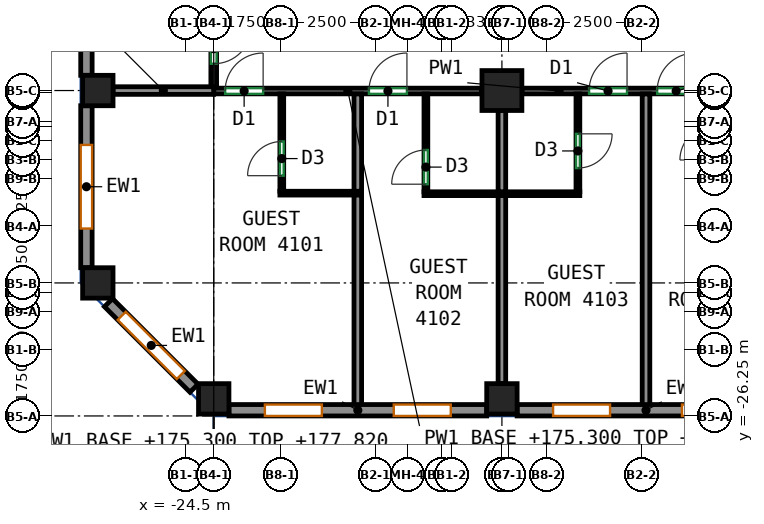
"""IFC4 building model, lengths in metres.
Left out: names, types, materials, properties, quantities, classifications, styles, units other than length and angle.
Written with IfcOpenShell. Run it as: python <this file> out.ifc"""

import sys

from ifc_helpers import new_model, si_unit, direction, frame, frame_2d, origin, origin_2d, place, context, subcontext, project, spatial, rectangle, extrude, source, transform, mapped, element, fill, save


model = new_model("IFC4")
c1 = context("Model", 3, precision=1e-05, world=origin(), true_north=direction((0.0, 1.0)))
c2 = subcontext(c1, "Body", "Model", "MODEL_VIEW")
j1 = project(units=[si_unit("LENGTHUNIT", "METRE"), si_unit("PLANEANGLEUNIT", "RADIAN")], contexts=[c1])
p1 = place(None, origin())
s1 = spatial("IfcSite", under=j1, at=p1, CompositionType="ELEMENT")
p2 = place(p1, origin())
s2 = spatial("IfcBuilding", under=s1, at=p2, CompositionType="ELEMENT")
p3 = place(p2, frame((0.0, 0.0, 175.3)))
s3 = spatial("IfcBuildingStorey", under=s2, at=p3, CompositionType="ELEMENT", Elevation=175.3)
m1 = source(origin(), c2, "Body", "SweptSolid", [
    extrude(rectangle(XDim=0.8, YDim=0.8, at=origin_2d()), origin(), (0.0, 0.0, 1.0), 3.12),
])
for number, where, z_axis, x_axis in (
    (1, (-26.8, -22.75, 0.0), (0.0, 0.0, 1.0), (1.0, 0.0, 0.0)),
    (2, (-26.8, -17.688, 0.0), (0.0, 0.0, 1.0), (1.0, 0.0, 0.0)),
    (3, (-23.75, -25.8, 0.0), (0.0, 0.0, 1.0), (1.0, 0.0, 0.0)),
    (4, (-16.167, -25.8, 0.0), (0.0, 0.0, 1.0), (1.0, 0.0, 0.0)),
):
    element("IfcColumn", number, at=place(p3, frame(where, z_axis=z_axis, x_axis=x_axis)), inside=s3, PredefinedType="COLUMN", context=c2, shape_type="MappedRepresentation", body=[
        mapped(m1, transform((0.0, 0.0, 0.0))),
    ])
m2 = source(origin(), c2, "Body", "SweptSolid", [
    extrude(rectangle(XDim=1.05, YDim=1.05, at=origin_2d()), origin(), (0.0, 0.0, 1.0), 3.12),
])
p4 = place(p3, frame((-16.167, -17.688, 0.0), z_axis=(0.0, 0.0, 1.0), x_axis=(1.0, 0.0, 0.0)))
e5 = element("IfcColumn", 5, at=p4, inside=s3, PredefinedType="COLUMN", context=c2, shape_type="MappedRepresentation", body=[
    mapped(m2, transform((0.0, 0.0, 0.0))),
])
m3 = source(origin(), c2, "Body", "SweptSolid", [
    extrude(rectangle(XDim=6.783, YDim=0.3, at=frame_2d((3.392, 0.0))), origin(), (0.0, 0.0, 1.0), 3.12),
])
p5 = place(p3, frame((-23.35, -26.1, 0.0), z_axis=(0.0, 0.0, 1.0), x_axis=(1.0, 0.0, 0.0)))
e6 = element("IfcWall", 6, at=p5, inside=s3, PredefinedType="SOLIDWALL", context=c2, shape_type="MappedRepresentation", body=[
    mapped(m3, transform((0.0, 0.0, 0.0))),
])
p6 = place(p5, frame((0.946, 0.0, 0.85)))
e7 = element("IfcOpeningElement", 7, at=p6, cuts=e6, PredefinedType="OPENING", context=c2, shape_type="SweptSolid", body=[
    extrude(rectangle(XDim=1.5, YDim=1.95, at=frame_2d((0.75, 0.975))), frame((0.0, 0.16, 0.0), z_axis=(0.0, -1.0, 0.0), x_axis=(1.0, 0.0, 0.0)), (0.0, 0.0, 1.0), 0.32),
])
p7 = place(p5, frame((4.337, 0.0, 0.85)))
e8 = element("IfcOpeningElement", 8, at=p7, cuts=e6, PredefinedType="OPENING", context=c2, shape_type="SweptSolid", body=[
    extrude(rectangle(XDim=1.5, YDim=1.95, at=frame_2d((0.75, 0.975))), frame((0.0, 0.16, 0.0), z_axis=(0.0, -1.0, 0.0), x_axis=(1.0, 0.0, 0.0)), (0.0, 0.0, 1.0), 0.32),
])
m4 = source(origin(), c2, "Body", "SweptSolid", [
    extrude(rectangle(XDim=6.783, YDim=0.3, at=frame_2d((3.392, 0.0))), origin(), (0.0, 0.0, 1.0), 3.12),
])
p8 = place(p3, frame((-15.767, -26.1, 0.0), z_axis=(0.0, 0.0, 1.0), x_axis=(1.0, 0.0, 0.0)))
e9 = element("IfcWall", 9, at=p8, inside=s3, PredefinedType="SOLIDWALL", context=c2, shape_type="MappedRepresentation", body=[
    mapped(m4, transform((0.0, 0.0, 0.0))),
])
p9 = place(p8, frame((0.946, 0.0, 0.85)))
e10 = element("IfcOpeningElement", 10, at=p9, cuts=e9, PredefinedType="OPENING", context=c2, shape_type="SweptSolid", body=[
    extrude(rectangle(XDim=1.5, YDim=1.95, at=frame_2d((0.75, 0.975))), frame((0.0, 0.16, 0.0), z_axis=(0.0, -1.0, 0.0), x_axis=(1.0, 0.0, 0.0)), (0.0, 0.0, 1.0), 0.32),
])
p10 = place(p8, frame((4.338, 0.0, 0.85)))
e11 = element("IfcOpeningElement", 11, at=p10, cuts=e9, PredefinedType="OPENING", context=c2, shape_type="SweptSolid", body=[
    extrude(rectangle(XDim=1.5, YDim=1.95, at=frame_2d((0.75, 0.975))), frame((0.0, 0.16, 0.0), z_axis=(0.0, -1.0, 0.0), x_axis=(1.0, 0.0, 0.0)), (0.0, 0.0, 1.0), 0.32),
])
m5 = source(origin(), c2, "Body", "SweptSolid", [
    extrude(rectangle(XDim=7.763, YDim=0.3, at=frame_2d((3.881, 0.0))), origin(), (0.0, 0.0, 1.0), 3.12),
])
p11 = place(p3, frame((-27.1, -9.525, 0.0), z_axis=(0.0, 0.0, 1.0), x_axis=(0.0, -1.0, 0.0)))
e12 = element("IfcWall", 12, at=p11, inside=s3, PredefinedType="SOLIDWALL", context=c2, shape_type="MappedRepresentation", body=[
    mapped(m5, transform((0.0, 0.0, 0.0))),
])
p12 = place(p11, frame((0.841, 0.0, 0.85)))
e13 = element("IfcOpeningElement", 13, at=p12, cuts=e12, PredefinedType="OPENING", context=c2, shape_type="SweptSolid", body=[
    extrude(rectangle(XDim=2.2, YDim=1.95, at=frame_2d((1.1, 0.975))), frame((0.0, 0.16, 0.0), z_axis=(0.0, -1.0, 0.0), x_axis=(1.0, 0.0, 0.0)), (0.0, 0.0, 1.0), 0.32),
])
p13 = place(p11, frame((4.722, 0.0, 0.85)))
e14 = element("IfcOpeningElement", 14, at=p13, cuts=e12, PredefinedType="OPENING", context=c2, shape_type="SweptSolid", body=[
    extrude(rectangle(XDim=2.2, YDim=1.95, at=frame_2d((1.1, 0.975))), frame((0.0, 0.16, 0.0), z_axis=(0.0, -1.0, 0.0), x_axis=(1.0, 0.0, 0.0)), (0.0, 0.0, 1.0), 0.32),
])
m6 = source(origin(), c2, "Body", "SweptSolid", [
    extrude(rectangle(XDim=4.263, YDim=0.3, at=frame_2d((2.131, 0.0))), origin(), (0.0, 0.0, 1.0), 3.12),
])
p14 = place(p3, frame((-27.1, -18.087, 0.0), z_axis=(0.0, 0.0, 1.0), x_axis=(0.0, -1.0, 0.0)))
e15 = element("IfcWall", 15, at=p14, inside=s3, PredefinedType="SOLIDWALL", context=c2, shape_type="MappedRepresentation", body=[
    mapped(m6, transform((0.0, 0.0, 0.0))),
])
p15 = place(p14, frame((1.031, 0.0, 0.85)))
e16 = element("IfcOpeningElement", 16, at=p15, cuts=e15, PredefinedType="OPENING", context=c2, shape_type="SweptSolid", body=[
    extrude(rectangle(XDim=2.2, YDim=1.95, at=frame_2d((1.1, 0.975))), frame((0.0, 0.16, 0.0), z_axis=(0.0, -1.0, 0.0), x_axis=(1.0, 0.0, 0.0)), (0.0, 0.0, 1.0), 0.32),
])
m7 = source(origin(), c2, "Body", "SweptSolid", [
    extrude(rectangle(XDim=3.182, YDim=0.3, at=frame_2d((1.591, 0.0))), origin(), (0.0, 0.0, 1.0), 3.12),
])
p16 = place(p3, frame((-26.519, -23.269, 0.0), z_axis=(0.0, 0.0, 1.0), x_axis=(0.707068419229, -0.707145141063, 0.0)))
e17 = element("IfcWall", 17, at=p16, inside=s3, PredefinedType="SOLIDWALL", context=c2, shape_type="MappedRepresentation", body=[
    mapped(m7, transform((0.0, 0.0, 0.0))),
])
p17 = place(p16, frame((0.491, 0.0, 0.85)))
e18 = element("IfcOpeningElement", 18, at=p17, cuts=e17, PredefinedType="OPENING", context=c2, shape_type="SweptSolid", body=[
    extrude(rectangle(XDim=2.2, YDim=1.95, at=frame_2d((1.1, 0.975))), frame((0.0, 0.16, 0.0), z_axis=(0.0, -1.0, 0.0), x_axis=(1.0, 0.0, 0.0)), (0.0, 0.0, 1.0), 0.32),
])
p18 = place(p3, frame((-23.75, -17.7, 0.0), z_axis=(0.0, 0.0, 1.0), x_axis=(1.0, 0.0, 0.0)))
e19 = element("IfcWall", 19, at=p18, inside=s3, PredefinedType="PARTITIONING", context=c2, shape_type="SweptSolid", body=[
    extrude(rectangle(XDim=7.058, YDim=0.15, at=frame_2d((3.529, 0.0))), origin(), (0.0, 0.0, 1.0), 2.52),
])
p19 = place(p18, frame((0.3, 0.0, 0.0)))
e20 = element("IfcOpeningElement", 20, at=p19, cuts=e19, PredefinedType="OPENING", context=c2, shape_type="SweptSolid", body=[
    extrude(rectangle(XDim=1.0, YDim=2.1, at=frame_2d((0.5, 1.05))), frame((0.0, 0.085, 0.0), z_axis=(0.0, -1.0, 0.0), x_axis=(1.0, 0.0, 0.0)), (0.0, 0.0, 1.0), 0.17),
])
p20 = place(p18, frame((4.084, 0.0, 0.0)))
e21 = element("IfcOpeningElement", 21, at=p20, cuts=e19, PredefinedType="OPENING", context=c2, shape_type="SweptSolid", body=[
    extrude(rectangle(XDim=1.0, YDim=2.1, at=frame_2d((0.5, 1.05))), frame((0.0, 0.085, 0.0), z_axis=(0.0, -1.0, 0.0), x_axis=(1.0, 0.0, 0.0)), (0.0, 0.0, 1.0), 0.17),
])
p21 = place(p3, frame((-15.642, -17.7, 0.0), z_axis=(0.0, 0.0, 1.0), x_axis=(1.0, 0.0, 0.0)))
e22 = element("IfcWall", 22, at=p21, inside=s3, PredefinedType="PARTITIONING", context=c2, shape_type="SweptSolid", body=[
    extrude(rectangle(XDim=6.534, YDim=0.15, at=frame_2d((3.267, 0.0))), origin(), (0.0, 0.0, 1.0), 3.12),
])
p22 = place(p21, frame((1.768, 0.0, 0.0)))
e23 = element("IfcOpeningElement", 23, at=p22, cuts=e22, PredefinedType="OPENING", context=c2, shape_type="SweptSolid", body=[
    extrude(rectangle(XDim=1.0, YDim=2.1, at=frame_2d((0.5, 1.05))), frame((0.0, 0.085, 0.0), z_axis=(0.0, -1.0, 0.0), x_axis=(1.0, 0.0, 0.0)), (0.0, 0.0, 1.0), 0.17),
])
p23 = place(p21, frame((3.56, 0.0, 0.0)))
e24 = element("IfcOpeningElement", 24, at=p23, cuts=e22, PredefinedType="OPENING", context=c2, shape_type="SweptSolid", body=[
    extrude(rectangle(XDim=1.0, YDim=2.1, at=frame_2d((0.5, 1.05))), frame((0.0, 0.085, 0.0), z_axis=(0.0, -1.0, 0.0), x_axis=(1.0, 0.0, 0.0)), (0.0, 0.0, 1.0), 0.17),
])
p24 = place(p3, frame((-23.75, -15.575, 0.0), z_axis=(0.0, 0.0, 1.0), x_axis=(0.0, -1.0, 0.0)))
e25 = element("IfcWall", 25, at=p24, inside=s3, PredefinedType="PARTITIONING", context=c2, shape_type="SweptSolid", body=[
    extrude(rectangle(XDim=2.023, YDim=0.15, at=frame_2d((1.011, 0.0))), origin(), (0.0, 0.0, 1.0), 2.52),
])
p25 = place(p24, frame((0.408, 0.0, 0.0)))
e26 = element("IfcOpeningElement", 26, at=p25, cuts=e25, PredefinedType="OPENING", context=c2, shape_type="SweptSolid", body=[
    extrude(rectangle(XDim=1.0, YDim=2.1, at=frame_2d((0.5, 1.05))), frame((0.0, 0.085, 0.0), z_axis=(0.0, -1.0, 0.0), x_axis=(1.0, 0.0, 0.0)), (0.0, 0.0, 1.0), 0.17),
])
p26 = place(p3, frame((-21.959, -20.338, 0.0), z_axis=(0.0, 0.0, 1.0), x_axis=(0.0, 1.0, 0.0)))
e27 = element("IfcWall", 27, at=p26, inside=s3, PredefinedType="PARTITIONING", context=c2, shape_type="SweptSolid", body=[
    extrude(rectangle(XDim=2.561, YDim=0.1, at=frame_2d((1.28, 0.0))), origin(), (0.0, 0.0, 1.0), 3.12),
])
p27 = place(p26, frame((0.41, 0.0, 0.0)))
e28 = element("IfcOpeningElement", 28, at=p27, cuts=e27, PredefinedType="OPENING", context=c2, shape_type="SweptSolid", body=[
    extrude(rectangle(XDim=0.9, YDim=2.1, at=frame_2d((0.45, 1.05))), frame((0.0, 0.06, 0.0), z_axis=(0.0, -1.0, 0.0), x_axis=(1.0, 0.0, 0.0)), (0.0, 0.0, 1.0), 0.12),
])
p28 = place(p3, frame((-22.009, -20.388, 0.0), z_axis=(0.0, 0.0, 1.0), x_axis=(1.0, 0.0, 0.0)))
e29 = element("IfcWall", 29, at=p28, inside=s3, PredefinedType="PARTITIONING", context=c2, shape_type="SweptSolid", body=[
    extrude(rectangle(XDim=2.15, YDim=0.1, at=frame_2d((1.075, 0.0))), origin(), (0.0, 0.0, 1.0), 3.12),
])
p29 = place(p3, frame((-19.959, -26.0, 0.0), z_axis=(0.0, 0.0, 1.0), x_axis=(0.0, 1.0, 0.0)))
e30 = element("IfcWall", 30, at=p29, inside=s3, PredefinedType="PARTITIONING", context=c2, shape_type="SweptSolid", body=[
    extrude(rectangle(XDim=5.562, YDim=0.2, at=frame_2d((2.781, 0.0))), origin(), (0.0, 0.0, 1.0), 3.12),
])
p30 = place(p3, frame((-26.4, -17.688, 0.0), z_axis=(0.0, 0.0, 1.0), x_axis=(1.0, 0.0, 0.0)))
e31 = element("IfcWall", 31, at=p30, inside=s3, PredefinedType="PARTITIONING", context=c2, shape_type="SweptSolid", body=[
    extrude(rectangle(XDim=2.648, YDim=0.2, at=frame_2d((1.324, 0.0))), origin(), (0.0, 0.0, 1.0), 2.52),
])
p31 = place(p3, frame((-19.959, -20.338, 0.0), z_axis=(0.0, 0.0, 1.0), x_axis=(0.0, 1.0, 0.0)))
e32 = element("IfcWall", 32, at=p31, inside=s3, PredefinedType="PARTITIONING", context=c2, shape_type="SweptSolid", body=[
    extrude(rectangle(XDim=2.561, YDim=0.2, at=frame_2d((1.28, 0.0))), origin(), (0.0, 0.0, 1.0), 3.12),
])
p32 = place(p3, frame((-18.167, -20.352, 0.0), z_axis=(0.0, 0.0, 1.0), x_axis=(0.0, 1.0, 0.0)))
e33 = element("IfcWall", 33, at=p32, inside=s3, PredefinedType="PARTITIONING", context=c2, shape_type="SweptSolid", body=[
    extrude(rectangle(XDim=2.575, YDim=0.1, at=frame_2d((1.288, 0.0))), origin(), (0.0, 0.0, 1.0), 3.12),
])
p33 = place(p32, frame((0.2, 0.0, 0.0)))
e34 = element("IfcOpeningElement", 34, at=p33, cuts=e33, PredefinedType="OPENING", context=c2, shape_type="SweptSolid", body=[
    extrude(rectangle(XDim=0.9, YDim=2.1, at=frame_2d((0.45, 1.05))), frame((0.0, 0.06, 0.0), z_axis=(0.0, -1.0, 0.0), x_axis=(1.0, 0.0, 0.0)), (0.0, 0.0, 1.0), 0.12),
])
p34 = place(p3, frame((-18.217, -20.402, 0.0), z_axis=(0.0, 0.0, 1.0), x_axis=(1.0, 0.0, 0.0)))
e35 = element("IfcWall", 35, at=p34, inside=s3, PredefinedType="PARTITIONING", context=c2, shape_type="SweptSolid", body=[
    extrude(rectangle(XDim=4.1, YDim=0.1, at=frame_2d((2.05, 0.0))), origin(), (0.0, 0.0, 1.0), 3.12),
])
p35 = place(p3, frame((-16.167, -25.4, 0.0), z_axis=(0.0, 0.0, 1.0), x_axis=(0.0, 1.0, 0.0)))
e36 = element("IfcWall", 36, at=p35, inside=s3, PredefinedType="PARTITIONING", context=c2, shape_type="SweptSolid", body=[
    extrude(rectangle(XDim=4.948, YDim=0.2, at=frame_2d((2.474, 0.0))), origin(), (0.0, 0.0, 1.0), 3.12),
])
p36 = place(p3, frame((-16.167, -20.352, 0.0), z_axis=(0.0, 0.0, 1.0), x_axis=(0.0, 1.0, 0.0)))
e37 = element("IfcWall", 37, at=p36, inside=s3, PredefinedType="PARTITIONING", context=c2, shape_type="SweptSolid", body=[
    extrude(rectangle(XDim=2.14, YDim=0.2, at=frame_2d((1.07, 0.0))), origin(), (0.0, 0.0, 1.0), 3.12),
])
p37 = place(p3, frame((-14.167, -17.777, 0.0), z_axis=(0.0, 0.0, 1.0), x_axis=(0.0, -1.0, 0.0)))
e38 = element("IfcWall", 38, at=p37, inside=s3, PredefinedType="PARTITIONING", context=c2, shape_type="SweptSolid", body=[
    extrude(rectangle(XDim=2.575, YDim=0.1, at=frame_2d((1.288, 0.0))), origin(), (0.0, 0.0, 1.0), 3.12),
])
p38 = place(p37, frame((1.05, 0.0, 0.0)))
e39 = element("IfcOpeningElement", 39, at=p38, cuts=e38, PredefinedType="OPENING", context=c2, shape_type="SweptSolid", body=[
    extrude(rectangle(XDim=0.9, YDim=2.1, at=frame_2d((0.45, 1.05))), frame((0.0, 0.06, 0.0), z_axis=(0.0, -1.0, 0.0), x_axis=(1.0, 0.0, 0.0)), (0.0, 0.0, 1.0), 0.12),
])
p39 = place(p3, frame((-12.375, -26.0, 0.0), z_axis=(0.0, 0.0, 1.0), x_axis=(0.0, 1.0, 0.0)))
e40 = element("IfcWall", 40, at=p39, inside=s3, PredefinedType="PARTITIONING", context=c2, shape_type="SweptSolid", body=[
    extrude(rectangle(XDim=8.223, YDim=0.2, at=frame_2d((4.111, 0.0))), origin(), (0.0, 0.0, 1.0), 3.12),
])
p40 = place(p6, origin())
e41 = element("IfcWindow", 41, at=p40, inside=s3, PartitioningType="SINGLE_PANEL", PredefinedType="WINDOW", context=c2, shape_type="SweptSolid", body=[
    extrude(rectangle(XDim=1.5, YDim=1.95, at=frame_2d((0.75, 0.975))), frame((0.0, 0.03, 0.0), z_axis=(0.0, -1.0, 0.0), x_axis=(1.0, 0.0, 0.0)), (0.0, 0.0, 1.0), 0.06),
])
fill(e7, e41)
p41 = place(p7, origin())
e42 = element("IfcWindow", 42, at=p41, inside=s3, PartitioningType="SINGLE_PANEL", PredefinedType="WINDOW", context=c2, shape_type="SweptSolid", body=[
    extrude(rectangle(XDim=1.5, YDim=1.95, at=frame_2d((0.75, 0.975))), frame((0.0, 0.03, 0.0), z_axis=(0.0, -1.0, 0.0), x_axis=(1.0, 0.0, 0.0)), (0.0, 0.0, 1.0), 0.06),
])
fill(e8, e42)
p42 = place(p9, origin())
e43 = element("IfcWindow", 43, at=p42, inside=s3, PartitioningType="SINGLE_PANEL", PredefinedType="WINDOW", context=c2, shape_type="SweptSolid", body=[
    extrude(rectangle(XDim=1.5, YDim=1.95, at=frame_2d((0.75, 0.975))), frame((0.0, 0.03, 0.0), z_axis=(0.0, -1.0, 0.0), x_axis=(1.0, 0.0, 0.0)), (0.0, 0.0, 1.0), 0.06),
])
fill(e10, e43)
p43 = place(p10, origin())
e44 = element("IfcWindow", 44, at=p43, inside=s3, PartitioningType="SINGLE_PANEL", PredefinedType="WINDOW", context=c2, shape_type="SweptSolid", body=[
    extrude(rectangle(XDim=1.5, YDim=1.95, at=frame_2d((0.75, 0.975))), frame((0.0, 0.03, 0.0), z_axis=(0.0, -1.0, 0.0), x_axis=(1.0, 0.0, 0.0)), (0.0, 0.0, 1.0), 0.06),
])
fill(e11, e44)
p44 = place(p15, origin())
e45 = element("IfcWindow", 45, at=p44, inside=s3, PartitioningType="SINGLE_PANEL", PredefinedType="WINDOW", context=c2, shape_type="SweptSolid", body=[
    extrude(rectangle(XDim=2.2, YDim=1.95, at=frame_2d((1.1, 0.975))), frame((0.0, 0.03, 0.0), z_axis=(0.0, -1.0, 0.0), x_axis=(1.0, 0.0, 0.0)), (0.0, 0.0, 1.0), 0.06),
])
fill(e16, e45)
p45 = place(p17, origin())
e46 = element("IfcWindow", 46, at=p45, inside=s3, PartitioningType="SINGLE_PANEL", PredefinedType="WINDOW", context=c2, shape_type="SweptSolid", body=[
    extrude(rectangle(XDim=2.2, YDim=1.95, at=frame_2d((1.1, 0.975))), frame((0.0, 0.03, 0.0), z_axis=(0.0, -1.0, 0.0), x_axis=(1.0, 0.0, 0.0)), (0.0, 0.0, 1.0), 0.06),
])
fill(e18, e46)
p46 = place(p33, origin())
e47 = element("IfcDoor", 47, at=p46, inside=s3, OperationType="SINGLE_SWING_LEFT", PredefinedType="DOOR", context=c2, shape_type="SweptSolid", body=[
    extrude(rectangle(XDim=0.9, YDim=2.1, at=frame_2d((0.45, 1.05))), frame((0.0, 0.025, 0.0), z_axis=(0.0, -1.0, 0.0), x_axis=(1.0, 0.0, 0.0)), (0.0, 0.0, 1.0), 0.05),
])
fill(e34, e47)
p47 = place(p27, origin())
e48 = element("IfcDoor", 48, at=p47, inside=s3, OperationType="SINGLE_SWING_LEFT", PredefinedType="DOOR", context=c2, shape_type="SweptSolid", body=[
    extrude(rectangle(XDim=0.9, YDim=2.1, at=frame_2d((0.45, 1.05))), frame((0.0, 0.025, 0.0), z_axis=(0.0, -1.0, 0.0), x_axis=(1.0, 0.0, 0.0)), (0.0, 0.0, 1.0), 0.05),
])
fill(e28, e48)
p48 = place(p38, origin())
e49 = element("IfcDoor", 49, at=p48, inside=s3, OperationType="SINGLE_SWING_LEFT", PredefinedType="DOOR", context=c2, shape_type="SweptSolid", body=[
    extrude(rectangle(XDim=0.9, YDim=2.1, at=frame_2d((0.45, 1.05))), frame((0.0, 0.025, 0.0), z_axis=(0.0, -1.0, 0.0), x_axis=(1.0, 0.0, 0.0)), (0.0, 0.0, 1.0), 0.05),
])
fill(e39, e49)
p49 = place(p19, origin())
e50 = element("IfcDoor", 50, at=p49, inside=s3, OperationType="SINGLE_SWING_RIGHT", PredefinedType="DOOR", context=c2, shape_type="SweptSolid", body=[
    extrude(rectangle(XDim=1.0, YDim=2.1, at=frame_2d((0.5, 1.05))), frame((0.0, 0.025, 0.0), z_axis=(0.0, -1.0, 0.0), x_axis=(1.0, 0.0, 0.0)), (0.0, 0.0, 1.0), 0.05),
])
fill(e20, e50)
p50 = place(p20, origin())
e51 = element("IfcDoor", 51, at=p50, inside=s3, OperationType="SINGLE_SWING_RIGHT", PredefinedType="DOOR", context=c2, shape_type="SweptSolid", body=[
    extrude(rectangle(XDim=1.0, YDim=2.1, at=frame_2d((0.5, 1.05))), frame((0.0, 0.025, 0.0), z_axis=(0.0, -1.0, 0.0), x_axis=(1.0, 0.0, 0.0)), (0.0, 0.0, 1.0), 0.05),
])
fill(e21, e51)
p51 = place(p22, origin())
e52 = element("IfcDoor", 52, at=p51, inside=s3, OperationType="SINGLE_SWING_RIGHT", PredefinedType="DOOR", context=c2, shape_type="SweptSolid", body=[
    extrude(rectangle(XDim=1.0, YDim=2.1, at=frame_2d((0.5, 1.05))), frame((0.0, 0.025, 0.0), z_axis=(0.0, -1.0, 0.0), x_axis=(1.0, 0.0, 0.0)), (0.0, 0.0, 1.0), 0.05),
])
fill(e23, e52)
p52 = place(p23, origin())
e53 = element("IfcDoor", 53, at=p52, inside=s3, OperationType="SINGLE_SWING_RIGHT", PredefinedType="DOOR", context=c2, shape_type="SweptSolid", body=[
    extrude(rectangle(XDim=1.0, YDim=2.1, at=frame_2d((0.5, 1.05))), frame((0.0, 0.025, 0.0), z_axis=(0.0, -1.0, 0.0), x_axis=(1.0, 0.0, 0.0)), (0.0, 0.0, 1.0), 0.05),
])
fill(e24, e53)
p53 = place(p25, origin())
e54 = element("IfcDoor", 54, at=p53, inside=s3, OperationType="SINGLE_SWING_LEFT", PredefinedType="DOOR", context=c2, shape_type="SweptSolid", body=[
    extrude(rectangle(XDim=1.0, YDim=2.1, at=frame_2d((0.5, 1.05))), frame((0.0, 0.025, 0.0), z_axis=(0.0, -1.0, 0.0), x_axis=(1.0, 0.0, 0.0)), (0.0, 0.0, 1.0), 0.05),
])
fill(e26, e54)
save(model, sys.argv[1])
